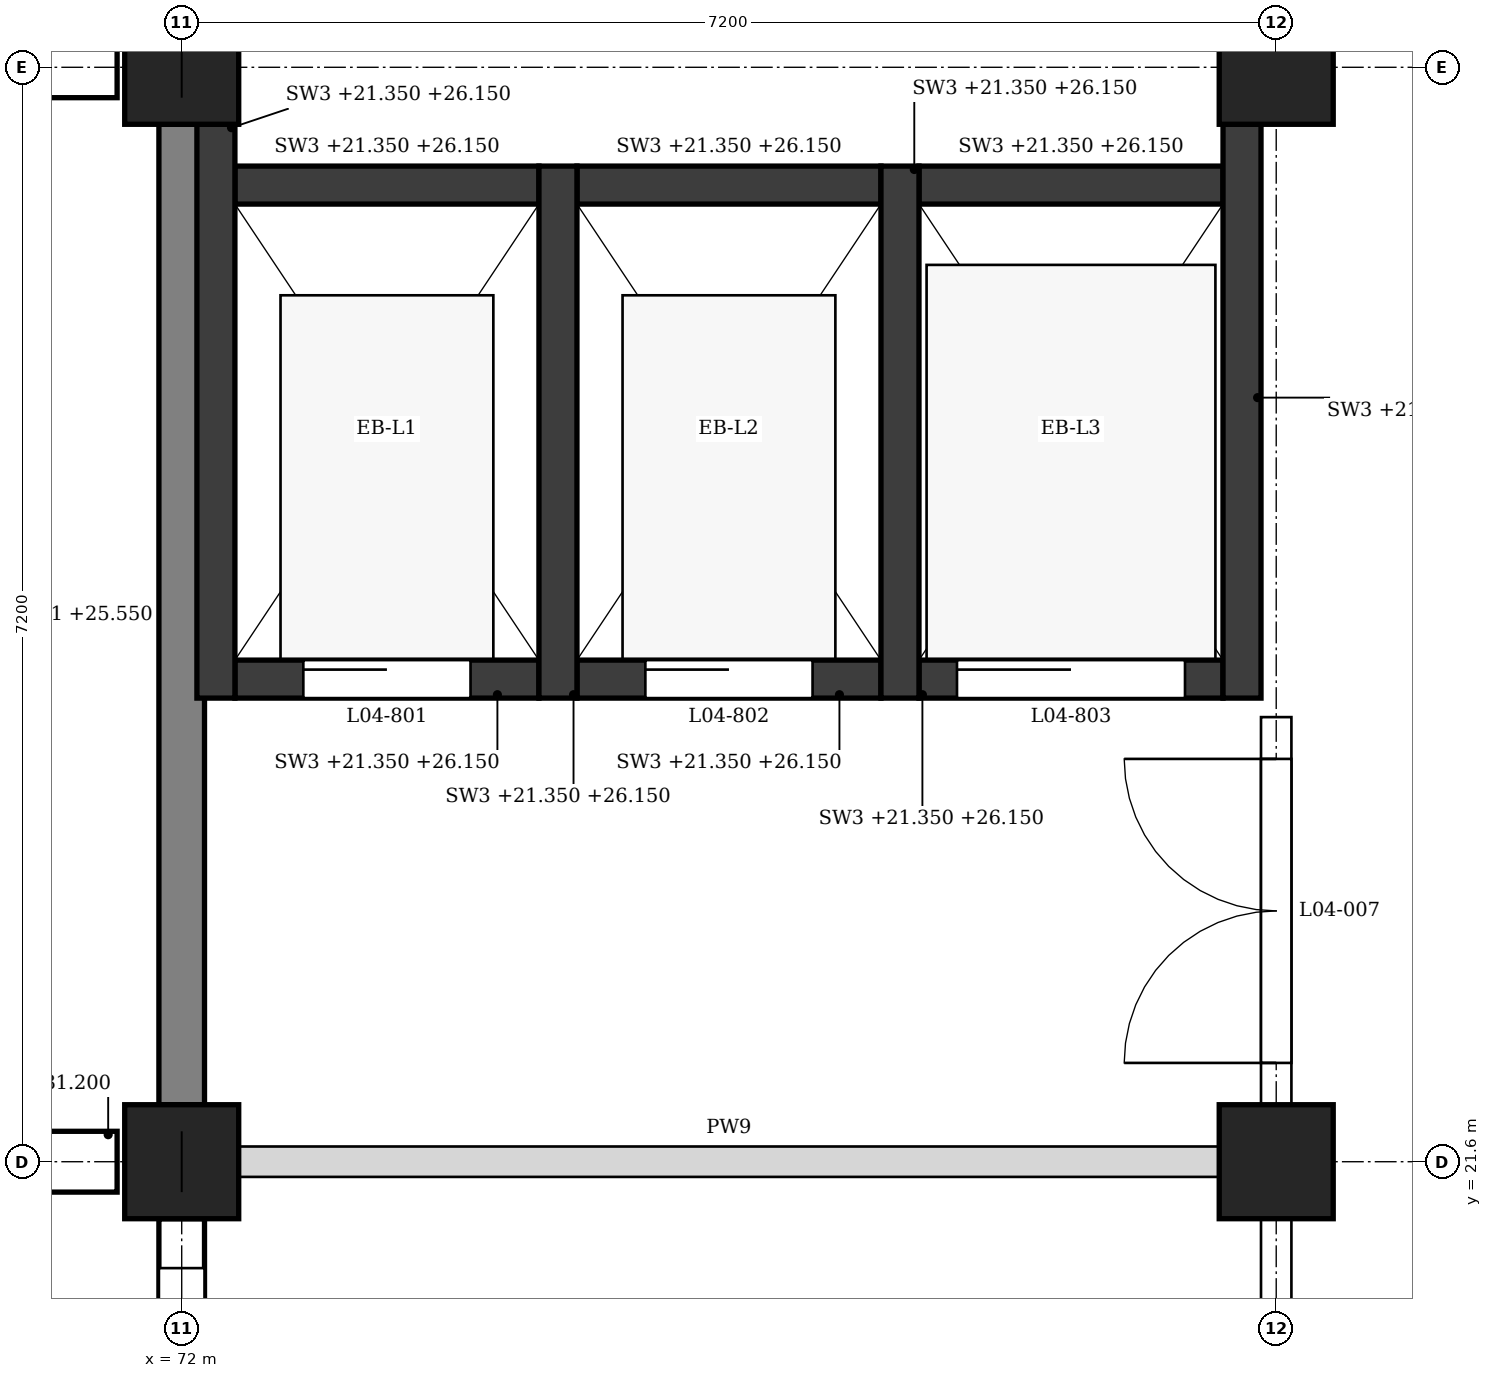
"""IFC4 building model, lengths in metres.
Left out: names, types, materials, properties, quantities, classifications, styles, units other than length and angle.
Written with IfcOpenShell. Run it as: python <this file> out.ifc"""

import sys

from ifc_helpers import new_model, si_unit, direction, frame, frame_2d, origin, origin_2d, place, context, subcontext, project, spatial, polyline, rectangle, outline, extrude, element, fill, save


model = new_model("IFC4")
c1 = context("Model", 3, precision=1e-05, world=origin(), true_north=direction((0.0, 1.0)))
c2 = subcontext(c1, "Body", "Model", "MODEL_VIEW")
j1 = project(units=[si_unit("LENGTHUNIT", "METRE"), si_unit("PLANEANGLEUNIT", "RADIAN")], contexts=[c1])
p1 = place(None, origin())
s1 = spatial("IfcSite", under=j1, at=p1, CompositionType="ELEMENT")
p2 = place(p1, origin())
s2 = spatial("IfcBuilding", under=s1, at=p2, CompositionType="ELEMENT")
p3 = place(p2, frame((0.0, 0.0, 21.6)))
s3 = spatial("IfcBuildingStorey", under=s2, at=p3, CompositionType="ELEMENT", Elevation=21.6)
for number, where, z_axis, x_axis in (
    (1, (72.0, 21.6, 0.0), (0.0, 0.0, 1.0), (1.0, 0.0, 0.0)),
    (2, (72.0, 28.8, 0.0), (0.0, 0.0, 1.0), (1.0, 0.0, 0.0)),
    (3, (79.2, 21.6, 0.0), (0.0, 0.0, 1.0), (1.0, 0.0, 0.0)),
    (4, (79.2, 28.8, 0.0), (0.0, 0.0, 1.0), (1.0, 0.0, 0.0)),
):
    element("IfcColumn", number, at=place(p3, frame(where, z_axis=z_axis, x_axis=x_axis)), inside=s3, PredefinedType="COLUMN", context=c2, shape_type="SweptSolid", body=[
        extrude(rectangle(XDim=0.75, YDim=0.75, at=origin_2d()), origin(), (0.0, 0.0, 1.0), 4.8),
    ])
p4 = place(p3, frame((72.0, 14.775, 0.0), z_axis=(0.0, 0.0, 1.0), x_axis=(0.0, 1.0, 0.0)))
e5 = element("IfcWall", 5, at=p4, inside=s3, PredefinedType="STANDARD", context=c2, shape_type="SweptSolid", body=[
    extrude(rectangle(XDim=6.45, YDim=0.3, at=frame_2d((3.225, 0.0))), origin(), (0.0, 0.0, 1.0), 3.95),
])
p5 = place(p4, frame((0.325, 0.0, 0.9)))
e6 = element("IfcOpeningElement", 6, at=p5, cuts=e5, PredefinedType="OPENING", context=c2, shape_type="SweptSolid", body=[
    extrude(outline(polyline([(0.0, 0.0), (5.8, 0.0), (5.8, 1.0), (2.9, 2.5), (0.0, 1.0), (0.0, 0.0)])), frame((0.0, 0.16, 0.0), z_axis=(0.0, -1.0, 0.0), x_axis=(1.0, 0.0, 0.0)), (0.0, 0.0, 1.0), 0.32),
])
p6 = place(p3, frame((72.0, 21.975, 0.0), z_axis=(0.0, 0.0, 1.0), x_axis=(0.0, 1.0, 0.0)))
e7 = element("IfcWall", 7, at=p6, inside=s3, PredefinedType="STANDARD", context=c2, shape_type="SweptSolid", body=[
    extrude(rectangle(XDim=6.45, YDim=0.3, at=frame_2d((3.225, 0.0))), origin(), (0.0, 0.0, 1.0), 3.95),
])
for number, where, z_axis, x_axis in (
    (8, (71.575, 21.6, -0.25), (0.0, 0.0, 1.0), (-1.0, 0.0, 0.0)),
    (9, (71.575, 28.8, -0.25), (0.0, 0.0, 1.0), (-1.0, 0.0, 0.0)),
):
    element("IfcWall", number, at=place(p3, frame(where, z_axis=z_axis, x_axis=x_axis)), inside=s3, PredefinedType="POLYGONAL", context=c2, shape_type="SweptSolid", body=[
        extrude(outline(polyline([(0.6, 0.0), (0.6, 9.175), (0.15, 9.85), (0.0, 9.85), (0.0, 0.0), (0.6, 0.0)])), frame((0.0, 0.2, 0.0), z_axis=(0.0, -1.0, 0.0), x_axis=(1.0, 0.0, 0.0)), (0.0, 0.0, 1.0), 0.4),
    ])
p7 = place(p3, frame((72.225, 24.65, -0.25), z_axis=(0.0, 0.0, 1.0), x_axis=(0.0, 1.0, 0.0)))
e10 = element("IfcWall", 10, at=p7, inside=s3, PredefinedType="SHEAR", context=c2, shape_type="SweptSolid", body=[
    extrude(rectangle(XDim=3.775, YDim=0.25, at=frame_2d((1.888, 0.0))), origin(), (0.0, 0.0, 1.0), 4.8),
])
for number, where, z_axis, x_axis in (
    (11, (74.475, 24.65, -0.25), (0.0, 0.0, 1.0), (0.0, 1.0, 0.0)),
    (12, (76.725, 24.65, -0.25), (0.0, 0.0, 1.0), (0.0, 1.0, 0.0)),
):
    element("IfcWall", number, at=place(p3, frame(where, z_axis=z_axis, x_axis=x_axis)), inside=s3, PredefinedType="SHEAR", context=c2, shape_type="SweptSolid", body=[
        extrude(rectangle(XDim=3.5, YDim=0.25, at=frame_2d((1.75, 0.0))), origin(), (0.0, 0.0, 1.0), 4.8),
    ])
p8 = place(p3, frame((78.975, 24.65, -0.25), z_axis=(0.0, 0.0, 1.0), x_axis=(0.0, 1.0, 0.0)))
e13 = element("IfcWall", 13, at=p8, inside=s3, PredefinedType="SHEAR", context=c2, shape_type="SweptSolid", body=[
    extrude(rectangle(XDim=3.775, YDim=0.25, at=frame_2d((1.888, 0.0))), origin(), (0.0, 0.0, 1.0), 4.8),
])
p9 = place(p3, frame((72.35, 24.775, -0.25), z_axis=(0.0, 0.0, 1.0), x_axis=(1.0, 0.0, 0.0)))
e14 = element("IfcWall", 14, at=p9, inside=s3, PredefinedType="SHEAR", context=c2, shape_type="SweptSolid", body=[
    extrude(rectangle(XDim=2.0, YDim=0.25, at=frame_2d((1.0, 0.0))), origin(), (0.0, 0.0, 1.0), 4.8),
])
p10 = place(p9, frame((0.45, 0.0, 0.25)))
e15 = element("IfcOpeningElement", 15, at=p10, cuts=e14, PredefinedType="OPENING", context=c2, shape_type="SweptSolid", body=[
    extrude(rectangle(XDim=1.1, YDim=2.1, at=frame_2d((0.55, 1.05))), frame((0.0, 0.135, 0.0), z_axis=(0.0, -1.0, 0.0), x_axis=(1.0, 0.0, 0.0)), (0.0, 0.0, 1.0), 0.27),
])
p11 = place(p3, frame((72.35, 28.025, -0.25), z_axis=(0.0, 0.0, 1.0), x_axis=(1.0, 0.0, 0.0)))
e16 = element("IfcWall", 16, at=p11, inside=s3, PredefinedType="SHEAR", context=c2, shape_type="SweptSolid", body=[
    extrude(rectangle(XDim=2.0, YDim=0.25, at=frame_2d((1.0, 0.0))), origin(), (0.0, 0.0, 1.0), 4.8),
])
p12 = place(p3, frame((74.6, 24.775, -0.25), z_axis=(0.0, 0.0, 1.0), x_axis=(1.0, 0.0, 0.0)))
e17 = element("IfcWall", 17, at=p12, inside=s3, PredefinedType="SHEAR", context=c2, shape_type="SweptSolid", body=[
    extrude(rectangle(XDim=2.0, YDim=0.25, at=frame_2d((1.0, 0.0))), origin(), (0.0, 0.0, 1.0), 4.8),
])
p13 = place(p12, frame((0.45, 0.0, 0.25)))
e18 = element("IfcOpeningElement", 18, at=p13, cuts=e17, PredefinedType="OPENING", context=c2, shape_type="SweptSolid", body=[
    extrude(rectangle(XDim=1.1, YDim=2.1, at=frame_2d((0.55, 1.05))), frame((0.0, 0.135, 0.0), z_axis=(0.0, -1.0, 0.0), x_axis=(1.0, 0.0, 0.0)), (0.0, 0.0, 1.0), 0.27),
])
p14 = place(p3, frame((74.6, 28.025, -0.25), z_axis=(0.0, 0.0, 1.0), x_axis=(1.0, 0.0, 0.0)))
e19 = element("IfcWall", 19, at=p14, inside=s3, PredefinedType="SHEAR", context=c2, shape_type="SweptSolid", body=[
    extrude(rectangle(XDim=2.0, YDim=0.25, at=frame_2d((1.0, 0.0))), origin(), (0.0, 0.0, 1.0), 4.8),
])
p15 = place(p3, frame((76.85, 24.775, -0.25), z_axis=(0.0, 0.0, 1.0), x_axis=(1.0, 0.0, 0.0)))
e20 = element("IfcWall", 20, at=p15, inside=s3, PredefinedType="SHEAR", context=c2, shape_type="SweptSolid", body=[
    extrude(rectangle(XDim=2.0, YDim=0.25, at=frame_2d((1.0, 0.0))), origin(), (0.0, 0.0, 1.0), 4.8),
])
p16 = place(p15, frame((0.25, 0.0, 0.25)))
e21 = element("IfcOpeningElement", 21, at=p16, cuts=e20, PredefinedType="OPENING", context=c2, shape_type="SweptSolid", body=[
    extrude(rectangle(XDim=1.5, YDim=2.1, at=frame_2d((0.75, 1.05))), frame((0.0, 0.135, 0.0), z_axis=(0.0, -1.0, 0.0), x_axis=(1.0, 0.0, 0.0)), (0.0, 0.0, 1.0), 0.27),
])
p17 = place(p3, frame((76.85, 28.025, -0.25), z_axis=(0.0, 0.0, 1.0), x_axis=(1.0, 0.0, 0.0)))
e22 = element("IfcWall", 22, at=p17, inside=s3, PredefinedType="SHEAR", context=c2, shape_type="SweptSolid", body=[
    extrude(rectangle(XDim=2.0, YDim=0.25, at=frame_2d((1.0, 0.0))), origin(), (0.0, 0.0, 1.0), 4.8),
])
p18 = place(p3, frame((72.375, 21.6, 0.0), z_axis=(0.0, 0.0, 1.0), x_axis=(1.0, 0.0, 0.0)))
e23 = element("IfcWall", 23, at=p18, inside=s3, PredefinedType="PARTITIONING", context=c2, shape_type="SweptSolid", body=[
    extrude(rectangle(XDim=6.45, YDim=0.2, at=frame_2d((3.225, 0.0))), origin(), (0.0, 0.0, 1.0), 3.8),
])
p19 = place(p3, frame((79.2, 14.775, 0.0), z_axis=(0.0, 0.0, 1.0), x_axis=(0.0, 1.0, 0.0)))
e24 = element("IfcWall", 24, at=p19, inside=s3, PredefinedType="PARTITIONING", context=c2, shape_type="SweptSolid", body=[
    extrude(rectangle(XDim=6.45, YDim=0.2, at=frame_2d((3.225, 0.0))), origin(), (0.0, 0.0, 1.0), 3.8),
])
p20 = place(p19, frame((2.725, 0.0, 0.0)))
e25 = element("IfcOpeningElement", 25, at=p20, cuts=e24, PredefinedType="OPENING", context=c2, shape_type="SweptSolid", body=[
    extrude(rectangle(XDim=1.0, YDim=2.1, at=frame_2d((0.5, 1.05))), frame((0.0, 0.11, 0.0), z_axis=(0.0, -1.0, 0.0), x_axis=(1.0, 0.0, 0.0)), (0.0, 0.0, 1.0), 0.22),
])
p21 = place(p3, frame((79.2, 21.975, 0.0), z_axis=(0.0, 0.0, 1.0), x_axis=(0.0, 1.0, 0.0)))
e26 = element("IfcWall", 26, at=p21, inside=s3, PredefinedType="PARTITIONING", context=c2, shape_type="SweptSolid", body=[
    extrude(rectangle(XDim=2.55, YDim=0.2, at=frame_2d((1.275, 0.0))), origin(), (0.0, 0.0, 1.0), 3.8),
])
p22 = place(p21, frame((0.275, 0.0, 0.0)))
e27 = element("IfcOpeningElement", 27, at=p22, cuts=e26, PredefinedType="OPENING", context=c2, shape_type="SweptSolid", body=[
    extrude(rectangle(XDim=2.0, YDim=2.4, at=frame_2d((1.0, 1.2))), frame((0.0, 0.11, 0.0), z_axis=(0.0, -1.0, 0.0), x_axis=(1.0, 0.0, 0.0)), (0.0, 0.0, 1.0), 0.22),
])
p23 = place(p5, origin())
e28 = element("IfcWindow", 28, at=p23, inside=s3, PartitioningType="TRIPLE_PANEL_VERTICAL", PredefinedType="WINDOW", context=c2, shape_type="SweptSolid", body=[
    extrude(outline(polyline([(0.0, 0.0), (5.8, 0.0), (5.8, 1.0), (2.9, 2.5), (0.0, 1.0), (0.0, 0.0)])), frame((0.0, 0.03, 0.0), z_axis=(0.0, -1.0, 0.0), x_axis=(1.0, 0.0, 0.0)), (0.0, 0.0, 1.0), 0.06),
])
fill(e6, e28)
p24 = place(p10, origin())
e29 = element("IfcDoor", 29, at=p24, inside=s3, OperationType="SLIDING_TO_LEFT", PredefinedType="DOOR", context=c2, shape_type="SweptSolid", body=[
    extrude(rectangle(XDim=1.1, YDim=2.1, at=frame_2d((0.55, 1.05))), frame((0.0, 0.025, 0.0), z_axis=(0.0, -1.0, 0.0), x_axis=(1.0, 0.0, 0.0)), (0.0, 0.0, 1.0), 0.05),
])
fill(e15, e29)
p25 = place(p13, origin())
e30 = element("IfcDoor", 30, at=p25, inside=s3, OperationType="SLIDING_TO_LEFT", PredefinedType="DOOR", context=c2, shape_type="SweptSolid", body=[
    extrude(rectangle(XDim=1.1, YDim=2.1, at=frame_2d((0.55, 1.05))), frame((0.0, 0.025, 0.0), z_axis=(0.0, -1.0, 0.0), x_axis=(1.0, 0.0, 0.0)), (0.0, 0.0, 1.0), 0.05),
])
fill(e18, e30)
p26 = place(p16, origin())
e31 = element("IfcDoor", 31, at=p26, inside=s3, OperationType="SLIDING_TO_LEFT", PredefinedType="DOOR", context=c2, shape_type="SweptSolid", body=[
    extrude(rectangle(XDim=1.5, YDim=2.1, at=frame_2d((0.75, 1.05))), frame((0.0, 0.025, 0.0), z_axis=(0.0, -1.0, 0.0), x_axis=(1.0, 0.0, 0.0)), (0.0, 0.0, 1.0), 0.05),
])
fill(e21, e31)
p27 = place(p22, origin())
e32 = element("IfcDoor", 32, at=p27, inside=s3, OperationType="DOUBLE_DOOR_SINGLE_SWING", PredefinedType="DOOR", context=c2, shape_type="SweptSolid", body=[
    extrude(rectangle(XDim=2.0, YDim=2.4, at=frame_2d((1.0, 1.2))), frame((0.0, 0.025, 0.0), z_axis=(0.0, -1.0, 0.0), x_axis=(1.0, 0.0, 0.0)), (0.0, 0.0, 1.0), 0.05),
])
fill(e27, e32)
save(model, sys.argv[1])
